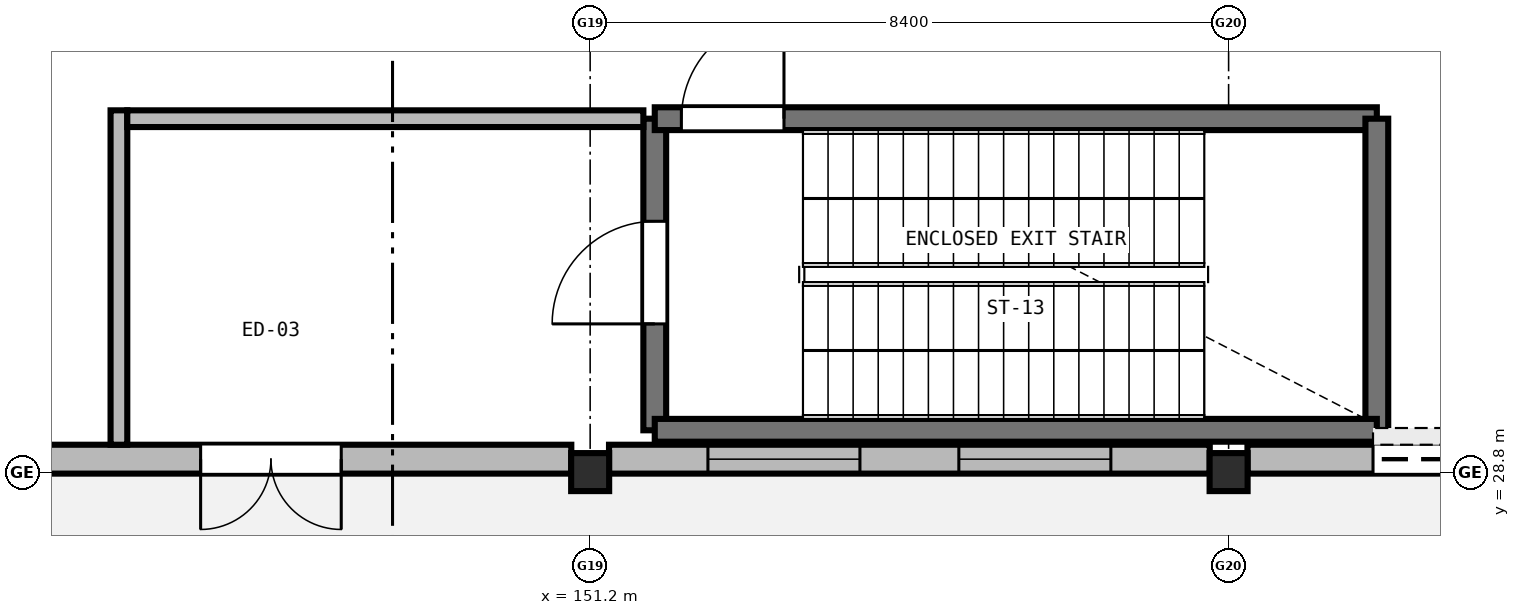
"""IFC4 building model, lengths in metres.
Left out: names, types, materials, properties, quantities, classifications, styles, units other than length and angle.
Written with IfcOpenShell. Run it as: python <this file> out.ifc"""

import sys

from ifc_helpers import new_model, si_unit, direction, frame, frame_2d, origin, origin_2d, place, context, subcontext, project, spatial, rectangle, extrude, element, fill, save


model = new_model("IFC4")
c1 = context("Model", 3, precision=1e-05, world=origin(), true_north=direction((0.0, 1.0)))
c2 = subcontext(c1, "Body", "Model", "MODEL_VIEW")
j1 = project(units=[si_unit("LENGTHUNIT", "METRE"), si_unit("PLANEANGLEUNIT", "RADIAN")], contexts=[c1])
p1 = place(None, origin())
s1 = spatial("IfcSite", under=j1, at=p1, CompositionType="ELEMENT")
p2 = place(p1, origin())
s2 = spatial("IfcBuilding", under=s1, at=p2, CompositionType="ELEMENT")
p3 = place(p2, origin())
s3 = spatial("IfcBuildingStorey", under=s2, at=p3, CompositionType="ELEMENT", Elevation=0.0)
for number, where, z_axis, x_axis in (
    (1, (151.2, 28.8, 0.0), (0.0, 0.0, 1.0), (1.0, 0.0, 0.0)),
    (2, (159.6, 28.8, 0.0), (0.0, 0.0, 1.0), (1.0, 0.0, 0.0)),
):
    element("IfcColumn", number, at=place(p3, frame(where, z_axis=z_axis, x_axis=x_axis)), inside=s3, PredefinedType="COLUMN", context=c2, shape_type="SweptSolid", body=[
        extrude(rectangle(XDim=0.5, YDim=0.5, at=origin_2d()), origin(), (0.0, 0.0, 1.0), 5.1),
    ])
p4 = place(p3, frame((167.752, 28.97, 0.0), z_axis=(0.0, 0.0, 1.0), x_axis=(-1.0, 0.0, 0.0)))
e3 = element("IfcWall", 3, at=p4, inside=s3, PredefinedType="SOLIDWALL", context=c2, shape_type="SweptSolid", body=[
    extrude(rectangle(XDim=7.904, YDim=0.38, at=frame_2d((3.952, 0.0))), origin(), (0.0, 0.0, 1.0), 4.01),
])
p5 = place(p4, frame((1.652, 0.0, 0.0)))
e4 = element("IfcOpeningElement", 4, at=p5, cuts=e3, PredefinedType="OPENING", context=c2, shape_type="SweptSolid", body=[
    extrude(rectangle(XDim=4.6, YDim=3.81, at=frame_2d((2.3, 1.905))), frame((0.0, 0.2, 0.0), z_axis=(0.0, -1.0, 0.0), x_axis=(1.0, 0.0, 0.0)), (0.0, 0.0, 1.0), 0.4),
])
p6 = place(p3, frame((159.352, 28.97, 0.0), z_axis=(0.0, 0.0, 1.0), x_axis=(-1.0, 0.0, 0.0)))
e5 = element("IfcWall", 5, at=p6, inside=s3, PredefinedType="SOLIDWALL", context=c2, shape_type="SweptSolid", body=[
    extrude(rectangle(XDim=7.904, YDim=0.38, at=frame_2d((3.952, 0.0))), origin(), (0.0, 0.0, 1.0), 4.01),
])
p7 = place(p6, frame((1.301, 0.0, 0.95)))
e6 = element("IfcOpeningElement", 6, at=p7, cuts=e5, PredefinedType="OPENING", context=c2, shape_type="SweptSolid", body=[
    extrude(rectangle(XDim=2.0, YDim=2.0, at=frame_2d((1.0, 1.0))), frame((0.0, 0.2, 0.0), z_axis=(0.0, -1.0, 0.0), x_axis=(1.0, 0.0, 0.0)), (0.0, 0.0, 1.0), 0.4),
])
p8 = place(p6, frame((4.603, 0.0, 0.95)))
e7 = element("IfcOpeningElement", 7, at=p8, cuts=e5, PredefinedType="OPENING", context=c2, shape_type="SweptSolid", body=[
    extrude(rectangle(XDim=2.0, YDim=2.0, at=frame_2d((1.0, 1.0))), frame((0.0, 0.2, 0.0), z_axis=(0.0, -1.0, 0.0), x_axis=(1.0, 0.0, 0.0)), (0.0, 0.0, 1.0), 0.4),
])
p9 = place(p3, frame((150.952, 28.97, 0.0), z_axis=(0.0, 0.0, 1.0), x_axis=(-1.0, 0.0, 0.0)))
e8 = element("IfcWall", 8, at=p9, inside=s3, PredefinedType="SOLIDWALL", context=c2, shape_type="SweptSolid", body=[
    extrude(rectangle(XDim=7.904, YDim=0.38, at=frame_2d((3.952, 0.0))), origin(), (0.0, 0.0, 1.0), 4.01),
])
p10 = place(p9, frame((3.027, 0.0, 0.0)))
e9 = element("IfcOpeningElement", 9, at=p10, cuts=e8, PredefinedType="OPENING", context=c2, shape_type="SweptSolid", body=[
    extrude(rectangle(XDim=1.85, YDim=2.3, at=frame_2d((0.925, 1.15))), frame((0.0, 0.2, 0.0), z_axis=(0.0, -1.0, 0.0), x_axis=(1.0, 0.0, 0.0)), (0.0, 0.0, 1.0), 0.4),
])
p11 = place(p3, frame((152.05, 29.35, 0.0), z_axis=(0.0, 0.0, 1.0), x_axis=(0.0, 1.0, 0.0)))
e10 = element("IfcWall", 10, at=p11, inside=s3, PredefinedType="SHEAR", context=c2, shape_type="SweptSolid", body=[
    extrude(rectangle(XDim=4.1, YDim=0.3, at=frame_2d((2.05, 0.0))), origin(), (0.0, 0.0, 1.0), 4.82),
])
p12 = place(p11, frame((1.4, 0.0, 0.0)))
e11 = element("IfcOpeningElement", 11, at=p12, cuts=e10, PredefinedType="OPENING", context=c2, shape_type="SweptSolid", body=[
    extrude(rectangle(XDim=1.35, YDim=2.2, at=frame_2d((0.675, 1.1))), frame((0.0, 0.16, 0.0), z_axis=(0.0, -1.0, 0.0), x_axis=(1.0, 0.0, 0.0)), (0.0, 0.0, 1.0), 0.32),
])
p13 = place(p3, frame((152.05, 33.45, 0.0), z_axis=(0.0, 0.0, 1.0), x_axis=(1.0, 0.0, 0.0)))
e12 = element("IfcWall", 12, at=p13, inside=s3, PredefinedType="SHEAR", context=c2, shape_type="SweptSolid", body=[
    extrude(rectangle(XDim=9.5, YDim=0.3, at=frame_2d((4.75, 0.0))), origin(), (0.0, 0.0, 1.0), 4.82),
])
p14 = place(p13, frame((0.35, 0.0, 0.0)))
e13 = element("IfcOpeningElement", 13, at=p14, cuts=e12, PredefinedType="OPENING", context=c2, shape_type="SweptSolid", body=[
    extrude(rectangle(XDim=1.35, YDim=2.2, at=frame_2d((0.675, 1.1))), frame((0.0, 0.16, 0.0), z_axis=(0.0, -1.0, 0.0), x_axis=(1.0, 0.0, 0.0)), (0.0, 0.0, 1.0), 0.32),
])
p15 = place(p3, frame((161.55, 33.45, 0.0), z_axis=(0.0, 0.0, 1.0), x_axis=(0.0, -1.0, 0.0)))
e14 = element("IfcWall", 14, at=p15, inside=s3, PredefinedType="SHEAR", context=c2, shape_type="SweptSolid", body=[
    extrude(rectangle(XDim=4.1, YDim=0.3, at=frame_2d((2.05, 0.0))), origin(), (0.0, 0.0, 1.0), 4.82),
])
p16 = place(p3, frame((161.55, 29.35, 0.0), z_axis=(0.0, 0.0, 1.0), x_axis=(-1.0, 0.0, 0.0)))
e15 = element("IfcWall", 15, at=p16, inside=s3, PredefinedType="SHEAR", context=c2, shape_type="SweptSolid", body=[
    extrude(rectangle(XDim=9.5, YDim=0.3, at=frame_2d((4.75, 0.0))), origin(), (0.0, 0.0, 1.0), 4.82),
])
p17 = place(p3, frame((145.0, 29.16, 0.0), z_axis=(0.0, 0.0, 1.0), x_axis=(0.0, 1.0, 0.0)))
e16 = element("IfcWall", 16, at=p17, inside=s3, PredefinedType="SOLIDWALL", context=c2, shape_type="SweptSolid", body=[
    extrude(rectangle(XDim=4.4, YDim=0.22, at=frame_2d((2.2, 0.0))), origin(), (0.0, 0.0, 1.0), 4.005),
])
p18 = place(p3, frame((145.11, 33.45, 0.0), z_axis=(0.0, 0.0, 1.0), x_axis=(1.0, 0.0, 0.0)))
e17 = element("IfcWall", 17, at=p18, inside=s3, PredefinedType="SOLIDWALL", context=c2, shape_type="SweptSolid", body=[
    extrude(rectangle(XDim=6.79, YDim=0.22, at=frame_2d((3.395, 0.0))), origin(), (0.0, 0.0, 1.0), 4.105),
])
p19 = place(p5, origin())
e18 = element("IfcDoor", 18, at=p19, inside=s3, OperationType="ROLLINGUP", PredefinedType="GATE", context=c2, shape_type="SweptSolid", body=[
    extrude(rectangle(XDim=4.6, YDim=3.81, at=frame_2d((2.3, 1.905))), frame((0.0, 0.025, 0.0), z_axis=(0.0, -1.0, 0.0), x_axis=(1.0, 0.0, 0.0)), (0.0, 0.0, 1.0), 0.05),
])
fill(e4, e18)
p20 = place(p7, origin())
e19 = element("IfcWindow", 19, at=p20, inside=s3, PartitioningType="SINGLE_PANEL", PredefinedType="WINDOW", context=c2, shape_type="SweptSolid", body=[
    extrude(rectangle(XDim=2.0, YDim=2.0, at=frame_2d((1.0, 1.0))), frame((0.0, 0.03, 0.0), z_axis=(0.0, -1.0, 0.0), x_axis=(1.0, 0.0, 0.0)), (0.0, 0.0, 1.0), 0.06),
])
fill(e6, e19)
p21 = place(p8, origin())
e20 = element("IfcWindow", 20, at=p21, inside=s3, PartitioningType="SINGLE_PANEL", PredefinedType="WINDOW", context=c2, shape_type="SweptSolid", body=[
    extrude(rectangle(XDim=2.0, YDim=2.0, at=frame_2d((1.0, 1.0))), frame((0.0, 0.03, 0.0), z_axis=(0.0, -1.0, 0.0), x_axis=(1.0, 0.0, 0.0)), (0.0, 0.0, 1.0), 0.06),
])
fill(e7, e20)
p22 = place(p10, origin())
e21 = element("IfcDoor", 21, at=p22, inside=s3, OperationType="DOUBLE_DOOR_SINGLE_SWING", PredefinedType="DOOR", context=c2, shape_type="SweptSolid", body=[
    extrude(rectangle(XDim=1.85, YDim=2.3, at=frame_2d((0.925, 1.15))), frame((0.0, 0.025, 0.0), z_axis=(0.0, -1.0, 0.0), x_axis=(1.0, 0.0, 0.0)), (0.0, 0.0, 1.0), 0.05),
])
fill(e9, e21)
p23 = place(p14, origin())
e22 = element("IfcDoor", 22, at=p23, inside=s3, OperationType="SINGLE_SWING_RIGHT", PredefinedType="DOOR", context=c2, shape_type="SweptSolid", body=[
    extrude(rectangle(XDim=1.35, YDim=2.2, at=frame_2d((0.675, 1.1))), frame((0.0, 0.025, 0.0), z_axis=(0.0, -1.0, 0.0), x_axis=(1.0, 0.0, 0.0)), (0.0, 0.0, 1.0), 0.05),
])
fill(e13, e22)
p24 = place(p12, origin())
e23 = element("IfcDoor", 23, at=p24, inside=s3, OperationType="SINGLE_SWING_LEFT", PredefinedType="DOOR", context=c2, shape_type="SweptSolid", body=[
    extrude(rectangle(XDim=1.35, YDim=2.2, at=frame_2d((0.675, 1.1))), frame((0.0, 0.025, 0.0), z_axis=(0.0, -1.0, 0.0), x_axis=(1.0, 0.0, 0.0)), (0.0, 0.0, 1.0), 0.05),
])
fill(e11, e23)
save(model, sys.argv[1])
